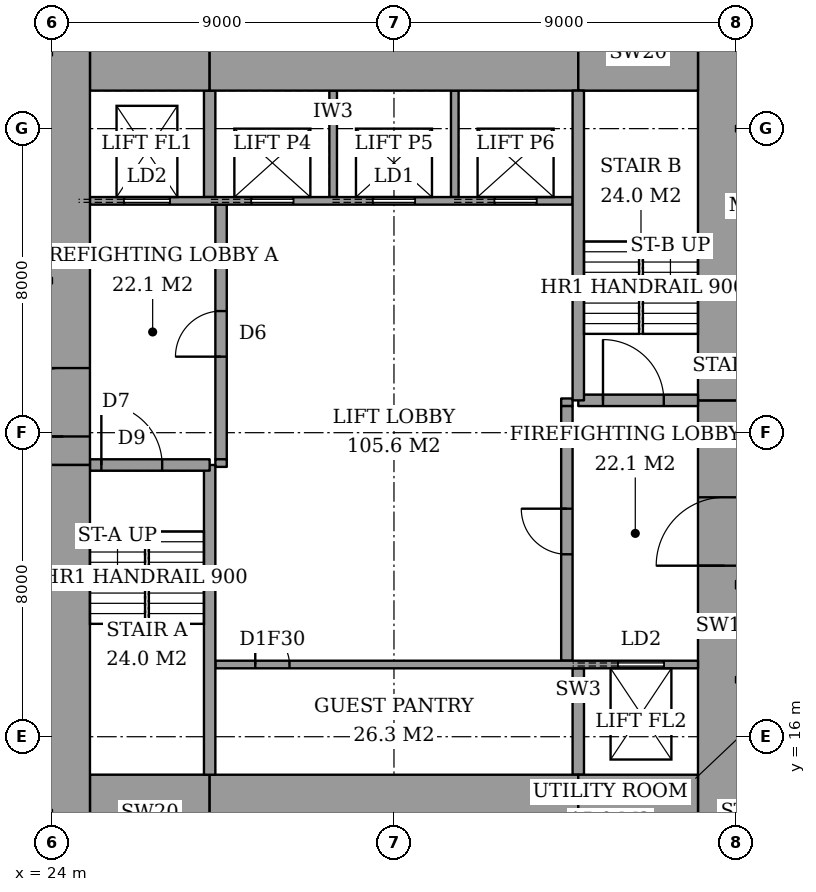
"""IFC4 building model, lengths in metres.
Left out: names, types, materials, properties, quantities, classifications, styles, units other than length and angle.
Written with IfcOpenShell. Run it as: python <this file> out.ifc"""

import sys

from ifc_helpers import new_model, si_unit, direction, frame, frame_2d, origin, place, context, subcontext, project, spatial, rectangle, extrude, element, fill, save


model = new_model("IFC4")
c1 = context("Model", 3, precision=1e-05, world=origin(), true_north=direction((0.0, 1.0)))
c2 = subcontext(c1, "Body", "Model", "MODEL_VIEW")
j1 = project(units=[si_unit("LENGTHUNIT", "METRE"), si_unit("PLANEANGLEUNIT", "RADIAN")], contexts=[c1])
p1 = place(None, origin())
s1 = spatial("IfcSite", under=j1, at=p1, CompositionType="ELEMENT")
p2 = place(p1, origin())
s2 = spatial("IfcBuilding", under=s1, at=p2, CompositionType="ELEMENT")
p3 = place(p2, frame((0.0, 0.0, 221.8)))
s3 = spatial("IfcBuildingStorey", under=s2, at=p3, CompositionType="ELEMENT", Elevation=221.8)
p4 = place(p3, frame((25.0, 14.0, 0.0), z_axis=(0.0, 0.0, 1.0), x_axis=(1.0, 0.0, 0.0)))
e1 = element("IfcWall", 1, at=p4, inside=s3, PredefinedType="SHEAR", context=c2, shape_type="SweptSolid", body=[
    extrude(rectangle(XDim=3.15, YDim=2.0, at=frame_2d((1.575, 0.0))), origin(), (0.0, 0.0, 1.0), 3.6),
])
p5 = place(p3, frame((28.15, 14.0, 0.0), z_axis=(0.0, 0.0, 1.0), x_axis=(1.0, 0.0, 0.0)))
e2 = element("IfcWall", 2, at=p5, inside=s3, PredefinedType="SHEAR", context=c2, shape_type="SweptSolid", body=[
    extrude(rectangle(XDim=9.7, YDim=2.0, at=frame_2d((4.85, 0.0))), origin(), (0.0, 0.0, 1.0), 3.6),
])
for number, where, z_axis, x_axis in (
    (3, (37.85, 14.0, 0.0), (0.0, 0.0, 1.0), (1.0, 0.0, 0.0)),
    (4, (25.0, 34.0, 0.0), (0.0, 0.0, 1.0), (1.0, 0.0, 0.0)),
):
    element("IfcWall", number, at=place(p3, frame(where, z_axis=z_axis, x_axis=x_axis)), inside=s3, PredefinedType="SHEAR", context=c2, shape_type="SweptSolid", body=[
        extrude(rectangle(XDim=3.15, YDim=2.0, at=frame_2d((1.575, 0.0))), origin(), (0.0, 0.0, 1.0), 3.6),
    ])
p6 = place(p3, frame((28.15, 34.0, 0.0), z_axis=(0.0, 0.0, 1.0), x_axis=(1.0, 0.0, 0.0)))
e5 = element("IfcWall", 5, at=p6, inside=s3, PredefinedType="SHEAR", context=c2, shape_type="SweptSolid", body=[
    extrude(rectangle(XDim=9.7, YDim=2.0, at=frame_2d((4.85, 0.0))), origin(), (0.0, 0.0, 1.0), 3.6),
])
p7 = place(p3, frame((37.85, 34.0, 0.0), z_axis=(0.0, 0.0, 1.0), x_axis=(1.0, 0.0, 0.0)))
e6 = element("IfcWall", 6, at=p7, inside=s3, PredefinedType="SHEAR", context=c2, shape_type="SweptSolid", body=[
    extrude(rectangle(XDim=3.15, YDim=2.0, at=frame_2d((1.575, 0.0))), origin(), (0.0, 0.0, 1.0), 3.6),
])
p8 = place(p3, frame((24.3, 13.0, 0.0), z_axis=(0.0, 0.0, 1.0), x_axis=(0.0, 1.0, 0.0)))
e7 = element("IfcWall", 7, at=p8, inside=s3, PredefinedType="SHEAR", context=c2, shape_type="SweptSolid", body=[
    extrude(rectangle(XDim=10.15, YDim=1.4, at=frame_2d((5.075, 0.0))), origin(), (0.0, 0.0, 1.0), 3.6),
])
p9 = place(p3, frame((24.3, 23.15, 0.0), z_axis=(0.0, 0.0, 1.0), x_axis=(0.0, 1.0, 0.0)))
e8 = element("IfcWall", 8, at=p9, inside=s3, PredefinedType="SHEAR", context=c2, shape_type="SweptSolid", body=[
    extrude(rectangle(XDim=11.85, YDim=1.4, at=frame_2d((5.925, 0.0))), origin(), (0.0, 0.0, 1.0), 3.6),
])
p10 = place(p9, frame((0.75, 0.0, 0.0)))
e9 = element("IfcOpeningElement", 9, at=p10, cuts=e8, PredefinedType="OPENING", context=c2, shape_type="SweptSolid", body=[
    extrude(rectangle(XDim=1.8, YDim=2.4, at=frame_2d((0.9, 1.2))), frame((0.0, 0.71, 0.0), z_axis=(0.0, -1.0, 0.0), x_axis=(1.0, 0.0, 0.0)), (0.0, 0.0, 1.0), 1.42),
])
p11 = place(p3, frame((41.7, 13.0, 0.0), z_axis=(0.0, 0.0, 1.0), x_axis=(0.0, 1.0, 0.0)))
e10 = element("IfcWall", 10, at=p11, inside=s3, PredefinedType="SHEAR", context=c2, shape_type="SweptSolid", body=[
    extrude(rectangle(XDim=11.85, YDim=1.4, at=frame_2d((5.925, 0.0))), origin(), (0.0, 0.0, 1.0), 3.6),
])
p12 = place(p11, frame((7.5, 0.0, 0.0)))
e11 = element("IfcOpeningElement", 11, at=p12, cuts=e10, PredefinedType="OPENING", context=c2, shape_type="SweptSolid", body=[
    extrude(rectangle(XDim=1.8, YDim=2.4, at=frame_2d((0.9, 1.2))), frame((0.0, 0.71, 0.0), z_axis=(0.0, -1.0, 0.0), x_axis=(1.0, 0.0, 0.0)), (0.0, 0.0, 1.0), 1.42),
])
p13 = place(p3, frame((41.7, 24.85, 0.0), z_axis=(0.0, 0.0, 1.0), x_axis=(0.0, 1.0, 0.0)))
e12 = element("IfcWall", 12, at=p13, inside=s3, PredefinedType="SHEAR", context=c2, shape_type="SweptSolid", body=[
    extrude(rectangle(XDim=10.15, YDim=1.4, at=frame_2d((5.075, 0.0))), origin(), (0.0, 0.0, 1.0), 3.6),
])
p14 = place(p3, frame((28.15, 15.0, 0.0), z_axis=(0.0, 0.0, 1.0), x_axis=(0.0, 1.0, 0.0)))
e13 = element("IfcWall", 13, at=p14, inside=s3, PredefinedType="SHEAR", context=c2, shape_type="SweptSolid", body=[
    extrude(rectangle(XDim=8.15, YDim=0.3, at=frame_2d((4.075, 0.0))), origin(), (0.0, 0.0, 1.0), 3.6),
])
p15 = place(p3, frame((25.0, 23.15, 0.0), z_axis=(0.0, 0.0, 1.0), x_axis=(1.0, 0.0, 0.0)))
e14 = element("IfcWall", 14, at=p15, inside=s3, PredefinedType="SHEAR", context=c2, shape_type="SweptSolid", body=[
    extrude(rectangle(XDim=3.15, YDim=0.3, at=frame_2d((1.575, 0.0))), origin(), (0.0, 0.0, 1.0), 3.6),
])
p16 = place(p15, frame((0.3, 0.0, 0.0)))
e15 = element("IfcOpeningElement", 15, at=p16, cuts=e14, PredefinedType="OPENING", context=c2, shape_type="SweptSolid", body=[
    extrude(rectangle(XDim=1.6, YDim=2.1, at=frame_2d((0.8, 1.05))), frame((0.0, 0.16, 0.0), z_axis=(0.0, -1.0, 0.0), x_axis=(1.0, 0.0, 0.0)), (0.0, 0.0, 1.0), 0.32),
])
p17 = place(p3, frame((37.85, 24.85, 0.0), z_axis=(0.0, 0.0, 1.0), x_axis=(0.0, 1.0, 0.0)))
e16 = element("IfcWall", 16, at=p17, inside=s3, PredefinedType="SHEAR", context=c2, shape_type="SweptSolid", body=[
    extrude(rectangle(XDim=8.15, YDim=0.3, at=frame_2d((4.075, 0.0))), origin(), (0.0, 0.0, 1.0), 3.6),
])
p18 = place(p3, frame((37.85, 24.85, 0.0), z_axis=(0.0, 0.0, 1.0), x_axis=(1.0, 0.0, 0.0)))
e17 = element("IfcWall", 17, at=p18, inside=s3, PredefinedType="SHEAR", context=c2, shape_type="SweptSolid", body=[
    extrude(rectangle(XDim=3.15, YDim=0.3, at=frame_2d((1.575, 0.0))), origin(), (0.0, 0.0, 1.0), 3.6),
])
p19 = place(p18, frame((0.65, 0.0, 0.0)))
e18 = element("IfcOpeningElement", 18, at=p19, cuts=e17, PredefinedType="OPENING", context=c2, shape_type="SweptSolid", body=[
    extrude(rectangle(XDim=1.6, YDim=2.1, at=frame_2d((0.8, 1.05))), frame((0.0, 0.16, 0.0), z_axis=(0.0, -1.0, 0.0), x_axis=(1.0, 0.0, 0.0)), (0.0, 0.0, 1.0), 0.32),
])
p20 = place(p3, frame((28.45, 23.3, 0.0), z_axis=(0.0, 0.0, 1.0), x_axis=(0.0, 1.0, 0.0)))
e19 = element("IfcWall", 19, at=p20, inside=s3, PredefinedType="PARTITIONING", context=c2, shape_type="SweptSolid", body=[
    extrude(rectangle(XDim=6.7, YDim=0.3, at=frame_2d((3.35, 0.0))), origin(), (0.0, 0.0, 1.0), 3.6),
])
p21 = place(p20, frame((2.7, 0.0, 0.0)))
e20 = element("IfcOpeningElement", 20, at=p21, cuts=e19, PredefinedType="OPENING", context=c2, shape_type="SweptSolid", body=[
    extrude(rectangle(XDim=1.2, YDim=2.1, at=frame_2d((0.6, 1.05))), frame((0.0, 0.16, 0.0), z_axis=(0.0, -1.0, 0.0), x_axis=(1.0, 0.0, 0.0)), (0.0, 0.0, 1.0), 0.32),
])
p22 = place(p3, frame((37.55, 18.0, 0.0), z_axis=(0.0, 0.0, 1.0), x_axis=(0.0, 1.0, 0.0)))
e21 = element("IfcWall", 21, at=p22, inside=s3, PredefinedType="PARTITIONING", context=c2, shape_type="SweptSolid", body=[
    extrude(rectangle(XDim=6.7, YDim=0.3, at=frame_2d((3.35, 0.0))), origin(), (0.0, 0.0, 1.0), 3.6),
])
p23 = place(p22, frame((2.8, 0.0, 0.0)))
e22 = element("IfcOpeningElement", 22, at=p23, cuts=e21, PredefinedType="OPENING", context=c2, shape_type="SweptSolid", body=[
    extrude(rectangle(XDim=1.2, YDim=2.1, at=frame_2d((0.6, 1.05))), frame((0.0, 0.16, 0.0), z_axis=(0.0, -1.0, 0.0), x_axis=(1.0, 0.0, 0.0)), (0.0, 0.0, 1.0), 0.32),
])
p24 = place(p3, frame((28.3, 17.9, 0.0), z_axis=(0.0, 0.0, 1.0), x_axis=(1.0, 0.0, 0.0)))
e23 = element("IfcWall", 23, at=p24, inside=s3, PredefinedType="PARTITIONING", context=c2, shape_type="SweptSolid", body=[
    extrude(rectangle(XDim=12.7, YDim=0.2, at=frame_2d((6.35, 0.0))), origin(), (0.0, 0.0, 1.0), 3.6),
])
p25 = place(p24, frame((1.05, 0.0, 0.0)))
e24 = element("IfcOpeningElement", 24, at=p25, cuts=e23, PredefinedType="OPENING", context=c2, shape_type="SweptSolid", body=[
    extrude(rectangle(XDim=0.9, YDim=2.1, at=frame_2d((0.45, 1.05))), frame((0.0, 0.11, 0.0), z_axis=(0.0, -1.0, 0.0), x_axis=(1.0, 0.0, 0.0)), (0.0, 0.0, 1.0), 0.22),
])
p26 = place(p24, frame((10.6, 0.0, 0.0)))
e25 = element("IfcOpeningElement", 25, at=p26, cuts=e23, PredefinedType="OPENING", context=c2, shape_type="SweptSolid", body=[
    extrude(rectangle(XDim=1.2, YDim=2.1, at=frame_2d((0.6, 1.05))), frame((0.0, 0.11, 0.0), z_axis=(0.0, -1.0, 0.0), x_axis=(1.0, 0.0, 0.0)), (0.0, 0.0, 1.0), 0.22),
])
p27 = place(p3, frame((25.0, 30.1, 0.0), z_axis=(0.0, 0.0, 1.0), x_axis=(1.0, 0.0, 0.0)))
e26 = element("IfcWall", 26, at=p27, inside=s3, PredefinedType="PARTITIONING", context=c2, shape_type="SweptSolid", body=[
    extrude(rectangle(XDim=12.7, YDim=0.2, at=frame_2d((6.35, 0.0))), origin(), (0.0, 0.0, 1.0), 3.6),
])
p28 = place(p27, frame((4.25, 0.0, 0.0)))
e27 = element("IfcOpeningElement", 27, at=p28, cuts=e26, PredefinedType="OPENING", context=c2, shape_type="SweptSolid", body=[
    extrude(rectangle(XDim=1.1, YDim=2.1, at=frame_2d((0.55, 1.05))), frame((0.0, 0.11, 0.0), z_axis=(0.0, -1.0, 0.0), x_axis=(1.0, 0.0, 0.0)), (0.0, 0.0, 1.0), 0.22),
])
p29 = place(p27, frame((7.45, 0.0, 0.0)))
e28 = element("IfcOpeningElement", 28, at=p29, cuts=e26, PredefinedType="OPENING", context=c2, shape_type="SweptSolid", body=[
    extrude(rectangle(XDim=1.1, YDim=2.1, at=frame_2d((0.55, 1.05))), frame((0.0, 0.11, 0.0), z_axis=(0.0, -1.0, 0.0), x_axis=(1.0, 0.0, 0.0)), (0.0, 0.0, 1.0), 0.22),
])
p30 = place(p27, frame((10.65, 0.0, 0.0)))
e29 = element("IfcOpeningElement", 29, at=p30, cuts=e26, PredefinedType="OPENING", context=c2, shape_type="SweptSolid", body=[
    extrude(rectangle(XDim=1.1, YDim=2.1, at=frame_2d((0.55, 1.05))), frame((0.0, 0.11, 0.0), z_axis=(0.0, -1.0, 0.0), x_axis=(1.0, 0.0, 0.0)), (0.0, 0.0, 1.0), 0.22),
])
p31 = place(p27, frame((0.9, 0.0, 0.0)))
e30 = element("IfcOpeningElement", 30, at=p31, cuts=e26, PredefinedType="OPENING", context=c2, shape_type="SweptSolid", body=[
    extrude(rectangle(XDim=1.2, YDim=2.1, at=frame_2d((0.6, 1.05))), frame((0.0, 0.11, 0.0), z_axis=(0.0, -1.0, 0.0), x_axis=(1.0, 0.0, 0.0)), (0.0, 0.0, 1.0), 0.22),
])
p32 = place(p3, frame((37.85, 15.0, 0.0), z_axis=(0.0, 0.0, 1.0), x_axis=(0.0, 1.0, 0.0)))
e31 = element("IfcWall", 31, at=p32, inside=s3, PredefinedType="SHEAR", context=c2, shape_type="SweptSolid", body=[
    extrude(rectangle(XDim=2.8, YDim=0.3, at=frame_2d((1.4, 0.0))), origin(), (0.0, 0.0, 1.0), 3.6),
])
for number, where, z_axis, x_axis in (
    (32, (31.4, 30.2, 0.0), (0.0, 0.0, 1.0), (0.0, 1.0, 0.0)),
    (33, (34.6, 30.2, 0.0), (0.0, 0.0, 1.0), (0.0, 1.0, 0.0)),
):
    element("IfcWall", number, at=place(p3, frame(where, z_axis=z_axis, x_axis=x_axis)), inside=s3, PredefinedType="PARTITIONING", context=c2, shape_type="SweptSolid", body=[
        extrude(rectangle(XDim=2.8, YDim=0.2, at=frame_2d((1.4, 0.0))), origin(), (0.0, 0.0, 1.0), 3.6),
    ])
p33 = place(p3, frame((28.15, 30.2, 0.0), z_axis=(0.0, 0.0, 1.0), x_axis=(0.0, 1.0, 0.0)))
e34 = element("IfcWall", 34, at=p33, inside=s3, PredefinedType="SHEAR", context=c2, shape_type="SweptSolid", body=[
    extrude(rectangle(XDim=2.8, YDim=0.3, at=frame_2d((1.4, 0.0))), origin(), (0.0, 0.0, 1.0), 3.6),
])
for number, where, z_axis, x_axis in (
    (35, (28.3, 23.2, 0.0), (0.0, 0.0, 1.0), (1.0, 0.0, 0.0)),
    (36, (37.4, 24.8, 0.0), (0.0, 0.0, 1.0), (1.0, 0.0, 0.0)),
):
    element("IfcWall", number, at=place(p3, frame(where, z_axis=z_axis, x_axis=x_axis)), inside=s3, PredefinedType="PARTITIONING", context=c2, shape_type="SweptSolid", body=[
        extrude(rectangle(XDim=0.3, YDim=0.2, at=frame_2d((0.15, 0.0))), origin(), (0.0, 0.0, 1.0), 3.6),
    ])
p34 = place(p16, origin())
e37 = element("IfcDoor", 37, at=p34, inside=s3, OperationType="DOUBLE_DOOR_SINGLE_SWING", PredefinedType="DOOR", context=c2, shape_type="SweptSolid", body=[
    extrude(rectangle(XDim=1.6, YDim=2.1, at=frame_2d((0.8, 1.05))), frame((0.0, 0.025, 0.0), z_axis=(0.0, -1.0, 0.0), x_axis=(1.0, 0.0, 0.0)), (0.0, 0.0, 1.0), 0.05),
])
fill(e15, e37)
p35 = place(p19, origin())
e38 = element("IfcDoor", 38, at=p35, inside=s3, OperationType="DOUBLE_DOOR_SINGLE_SWING", PredefinedType="DOOR", context=c2, shape_type="SweptSolid", body=[
    extrude(rectangle(XDim=1.6, YDim=2.1, at=frame_2d((0.8, 1.05))), frame((0.0, 0.025, 0.0), z_axis=(0.0, -1.0, 0.0), x_axis=(1.0, 0.0, 0.0)), (0.0, 0.0, 1.0), 0.05),
])
fill(e18, e38)
p36 = place(p21, origin())
e39 = element("IfcDoor", 39, at=p36, inside=s3, OperationType="SINGLE_SWING_RIGHT", PredefinedType="DOOR", context=c2, shape_type="SweptSolid", body=[
    extrude(rectangle(XDim=1.2, YDim=2.1, at=frame_2d((0.6, 1.05))), frame((0.0, 0.025, 0.0), z_axis=(0.0, -1.0, 0.0), x_axis=(1.0, 0.0, 0.0)), (0.0, 0.0, 1.0), 0.05),
])
fill(e20, e39)
p37 = place(p23, origin())
e40 = element("IfcDoor", 40, at=p37, inside=s3, OperationType="SINGLE_SWING_LEFT", PredefinedType="DOOR", context=c2, shape_type="SweptSolid", body=[
    extrude(rectangle(XDim=1.2, YDim=2.1, at=frame_2d((0.6, 1.05))), frame((0.0, 0.025, 0.0), z_axis=(0.0, -1.0, 0.0), x_axis=(1.0, 0.0, 0.0)), (0.0, 0.0, 1.0), 0.05),
])
fill(e22, e40)
p38 = place(p10, origin())
e41 = element("IfcDoor", 41, at=p38, inside=s3, OperationType="DOUBLE_DOOR_DOUBLE_SWING", PredefinedType="DOOR", context=c2, shape_type="SweptSolid", body=[
    extrude(rectangle(XDim=1.8, YDim=2.4, at=frame_2d((0.9, 1.2))), frame((0.0, 0.025, 0.0), z_axis=(0.0, -1.0, 0.0), x_axis=(1.0, 0.0, 0.0)), (0.0, 0.0, 1.0), 0.05),
])
fill(e9, e41)
p39 = place(p12, origin())
e42 = element("IfcDoor", 42, at=p39, inside=s3, OperationType="DOUBLE_DOOR_DOUBLE_SWING", PredefinedType="DOOR", context=c2, shape_type="SweptSolid", body=[
    extrude(rectangle(XDim=1.8, YDim=2.4, at=frame_2d((0.9, 1.2))), frame((0.0, 0.025, 0.0), z_axis=(0.0, -1.0, 0.0), x_axis=(1.0, 0.0, 0.0)), (0.0, 0.0, 1.0), 0.05),
])
fill(e11, e42)
p40 = place(p25, origin())
e43 = element("IfcDoor", 43, at=p40, inside=s3, OperationType="SINGLE_SWING_RIGHT", PredefinedType="DOOR", context=c2, shape_type="SweptSolid", body=[
    extrude(rectangle(XDim=0.9, YDim=2.1, at=frame_2d((0.45, 1.05))), frame((0.0, 0.025, 0.0), z_axis=(0.0, -1.0, 0.0), x_axis=(1.0, 0.0, 0.0)), (0.0, 0.0, 1.0), 0.05),
])
fill(e24, e43)
p41 = place(p28, origin())
e44 = element("IfcDoor", 44, at=p41, inside=s3, OperationType="SLIDING_TO_LEFT", PredefinedType="DOOR", context=c2, shape_type="SweptSolid", body=[
    extrude(rectangle(XDim=1.1, YDim=2.1, at=frame_2d((0.55, 1.05))), frame((0.0, 0.025, 0.0), z_axis=(0.0, -1.0, 0.0), x_axis=(1.0, 0.0, 0.0)), (0.0, 0.0, 1.0), 0.05),
])
fill(e27, e44)
p42 = place(p29, origin())
e45 = element("IfcDoor", 45, at=p42, inside=s3, OperationType="SLIDING_TO_LEFT", PredefinedType="DOOR", context=c2, shape_type="SweptSolid", body=[
    extrude(rectangle(XDim=1.1, YDim=2.1, at=frame_2d((0.55, 1.05))), frame((0.0, 0.025, 0.0), z_axis=(0.0, -1.0, 0.0), x_axis=(1.0, 0.0, 0.0)), (0.0, 0.0, 1.0), 0.05),
])
fill(e28, e45)
p43 = place(p30, origin())
e46 = element("IfcDoor", 46, at=p43, inside=s3, OperationType="SLIDING_TO_LEFT", PredefinedType="DOOR", context=c2, shape_type="SweptSolid", body=[
    extrude(rectangle(XDim=1.1, YDim=2.1, at=frame_2d((0.55, 1.05))), frame((0.0, 0.025, 0.0), z_axis=(0.0, -1.0, 0.0), x_axis=(1.0, 0.0, 0.0)), (0.0, 0.0, 1.0), 0.05),
])
fill(e29, e46)
p44 = place(p31, origin())
e47 = element("IfcDoor", 47, at=p44, inside=s3, OperationType="SLIDING_TO_LEFT", PredefinedType="DOOR", context=c2, shape_type="SweptSolid", body=[
    extrude(rectangle(XDim=1.2, YDim=2.1, at=frame_2d((0.6, 1.05))), frame((0.0, 0.025, 0.0), z_axis=(0.0, -1.0, 0.0), x_axis=(1.0, 0.0, 0.0)), (0.0, 0.0, 1.0), 0.05),
])
fill(e30, e47)
p45 = place(p26, origin())
e48 = element("IfcDoor", 48, at=p45, inside=s3, OperationType="SLIDING_TO_LEFT", PredefinedType="DOOR", context=c2, shape_type="SweptSolid", body=[
    extrude(rectangle(XDim=1.2, YDim=2.1, at=frame_2d((0.6, 1.05))), frame((0.0, 0.025, 0.0), z_axis=(0.0, -1.0, 0.0), x_axis=(1.0, 0.0, 0.0)), (0.0, 0.0, 1.0), 0.05),
])
fill(e25, e48)
save(model, sys.argv[1])
